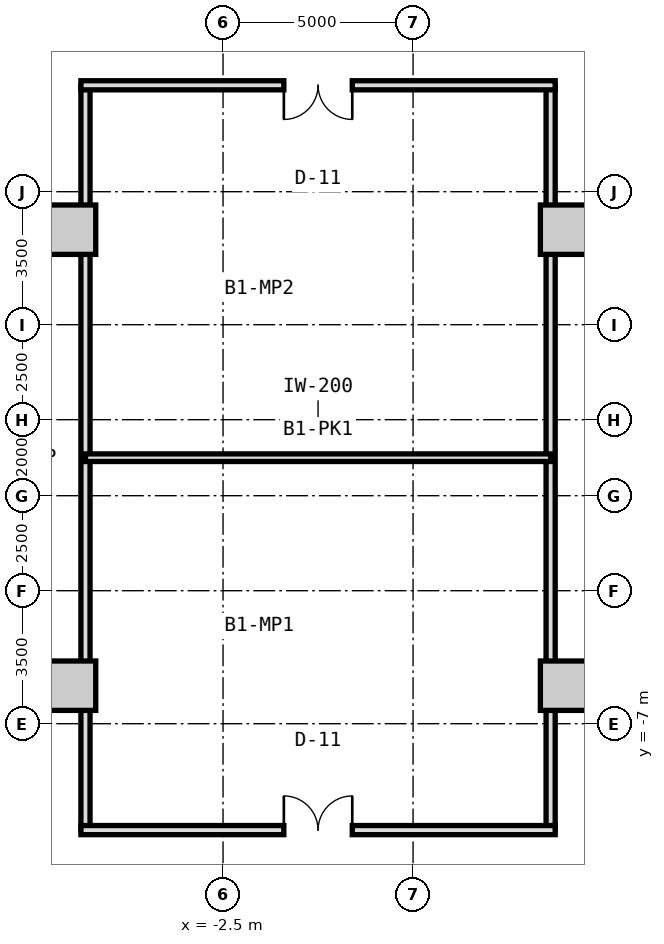
"""IFC4 building model, lengths in metres.
Left out: names, types, materials, properties, quantities, classifications, styles, units other than length and angle.
Written with IfcOpenShell. Run it as: python <this file> out.ifc"""

import sys

from ifc_helpers import new_model, si_unit, direction, frame, frame_2d, origin, origin_2d, place, context, subcontext, project, spatial, rectangle, extrude, source, transform, mapped, element, fill, save


model = new_model("IFC4")
c1 = context("Model", 3, precision=1e-05, world=origin(), true_north=direction((0.0, 1.0)))
c2 = subcontext(c1, "Body", "Model", "MODEL_VIEW")
j1 = project(units=[si_unit("LENGTHUNIT", "METRE"), si_unit("PLANEANGLEUNIT", "RADIAN")], contexts=[c1])
p1 = place(None, origin())
s1 = spatial("IfcSite", under=j1, at=p1, CompositionType="ELEMENT")
p2 = place(p1, origin())
s2 = spatial("IfcBuilding", under=s1, at=p2, CompositionType="ELEMENT")
p3 = place(p2, frame((0.0, 0.0, -4.2)))
s3 = spatial("IfcBuildingStorey", under=s2, at=p3, CompositionType="ELEMENT", Elevation=-4.2)
m1 = source(origin(), c2, "Body", "SweptSolid", [
    extrude(rectangle(XDim=1.3, YDim=1.3, at=origin_2d()), origin(), (0.0, 0.0, 1.0), 4.2),
])
for number, where, z_axis, x_axis in (
    (1, (-6.5, -6.0, 0.0), (0.0, 0.0, 1.0), (1.0, 0.0, 0.0)),
    (2, (-6.5, 6.0, 0.0), (0.0, 0.0, 1.0), (1.0, 0.0, 0.0)),
    (3, (6.5, -6.0, 0.0), (0.0, 0.0, 1.0), (1.0, 0.0, 0.0)),
    (4, (6.5, 6.0, 0.0), (0.0, 0.0, 1.0), (1.0, 0.0, 0.0)),
):
    element("IfcColumn", number, at=place(p3, frame(where, z_axis=z_axis, x_axis=x_axis)), inside=s3, PredefinedType="COLUMN", context=c2, shape_type="MappedRepresentation", body=[
        mapped(m1, transform((0.0, 0.0, 0.0), x_axis=(1.0, 0.0, 0.0), y_axis=(0.0, 1.0, 0.0), z_axis=(0.0, 0.0, 1.0), scale=1.0)),
    ])
m2 = source(origin(), c2, "Body", "SweptSolid", [
    extrude(rectangle(XDim=19.6, YDim=0.24, at=frame_2d((9.8, 0.0))), origin(), (0.0, 0.0, 1.0), 3.115),
])
for number, where, z_axis, x_axis in (
    (5, (-6.12, -9.8, 0.0), (0.0, 0.0, 1.0), (0.0, 1.0, 0.0)),
    (6, (6.12, -9.8, 0.0), (0.0, 0.0, 1.0), (0.0, 1.0, 0.0)),
):
    element("IfcWall", number, at=place(p3, frame(where, z_axis=z_axis, x_axis=x_axis)), inside=s3, PredefinedType="PARTITIONING", context=c2, shape_type="MappedRepresentation", body=[
        mapped(m2, transform((0.0, 0.0, 0.0), x_axis=(1.0, 0.0, 0.0), y_axis=(0.0, 1.0, 0.0), z_axis=(0.0, 0.0, 1.0), scale=1.0)),
    ])
m3 = source(origin(), c2, "Body", "SweptSolid", [
    extrude(rectangle(XDim=12.48, YDim=0.24, at=frame_2d((6.24, 0.0))), origin(), (0.0, 0.0, 1.0), 3.865),
])
p4 = place(p3, frame((-6.24, -9.8, 0.0), z_axis=(0.0, 0.0, 1.0), x_axis=(1.0, 0.0, 0.0)))
e7 = element("IfcWall", 7, at=p4, inside=s3, PredefinedType="PARTITIONING", context=c2, shape_type="MappedRepresentation", body=[
    mapped(m3, transform((0.0, 0.0, 0.0), x_axis=(1.0, 0.0, 0.0), y_axis=(0.0, 1.0, 0.0), z_axis=(0.0, 0.0, 1.0), scale=1.0)),
])
p5 = place(p4, frame((5.34, 0.0, 0.0)))
e8 = element("IfcOpeningElement", 8, at=p5, cuts=e7, PredefinedType="OPENING", context=c2, shape_type="SweptSolid", body=[
    extrude(rectangle(XDim=1.8, YDim=2.4, at=frame_2d((0.9, 1.2))), frame((0.0, 0.13, 0.0), z_axis=(0.0, -1.0, 0.0), x_axis=(1.0, 0.0, 0.0)), (0.0, 0.0, 1.0), 0.26),
])
p6 = place(p3, frame((-6.24, 9.8, 0.0), z_axis=(0.0, 0.0, 1.0), x_axis=(1.0, 0.0, 0.0)))
e9 = element("IfcWall", 9, at=p6, inside=s3, PredefinedType="PARTITIONING", context=c2, shape_type="MappedRepresentation", body=[
    mapped(m3, transform((0.0, 0.0, 0.0), x_axis=(1.0, 0.0, 0.0), y_axis=(0.0, 1.0, 0.0), z_axis=(0.0, 0.0, 1.0), scale=1.0)),
])
p7 = place(p6, frame((5.34, 0.0, 0.0)))
e10 = element("IfcOpeningElement", 10, at=p7, cuts=e9, PredefinedType="OPENING", context=c2, shape_type="SweptSolid", body=[
    extrude(rectangle(XDim=1.8, YDim=2.4, at=frame_2d((0.9, 1.2))), frame((0.0, 0.13, 0.0), z_axis=(0.0, -1.0, 0.0), x_axis=(1.0, 0.0, 0.0)), (0.0, 0.0, 1.0), 0.26),
])
m4 = source(origin(), c2, "Body", "SweptSolid", [
    extrude(rectangle(XDim=12.24, YDim=0.2, at=frame_2d((6.12, 0.0))), origin(), (0.0, 0.0, 1.0), 3.865),
])
p8 = place(p3, frame((-6.12, 0.0, 0.0), z_axis=(0.0, 0.0, 1.0), x_axis=(1.0, 0.0, 0.0)))
e11 = element("IfcWall", 11, at=p8, inside=s3, PredefinedType="PARTITIONING", context=c2, shape_type="MappedRepresentation", body=[
    mapped(m4, transform((0.0, 0.0, 0.0), x_axis=(1.0, 0.0, 0.0), y_axis=(0.0, 1.0, 0.0), z_axis=(0.0, 0.0, 1.0), scale=1.0)),
])
m5 = source(origin(), c2, "Body", "SweptSolid", [
    extrude(rectangle(XDim=1.8, YDim=2.4, at=frame_2d((0.9, 1.2))), frame((0.0, 0.025, 0.0), z_axis=(0.0, -1.0, 0.0), x_axis=(1.0, 0.0, 0.0)), (0.0, 0.0, 1.0), 0.05),
])
p9 = place(p5, origin())
e12 = element("IfcDoor", 12, at=p9, inside=s3, OperationType="DOUBLE_DOOR_SINGLE_SWING", PredefinedType="DOOR", context=c2, shape_type="MappedRepresentation", body=[
    mapped(m5, transform((0.0, 0.0, 0.0), x_axis=(1.0, 0.0, 0.0), y_axis=(0.0, 1.0, 0.0), z_axis=(0.0, 0.0, 1.0), scale=1.0)),
])
fill(e8, e12)
p10 = place(p7, frame((1.8, 0.0, 0.0), z_axis=(0.0, 0.0, 1.0), x_axis=(-1.0, 0.0, 0.0)))
e13 = element("IfcDoor", 13, at=p10, inside=s3, OperationType="DOUBLE_DOOR_SINGLE_SWING", PredefinedType="DOOR", context=c2, shape_type="MappedRepresentation", body=[
    mapped(m5, transform((0.0, 0.0, 0.0), x_axis=(1.0, 0.0, 0.0), y_axis=(0.0, 1.0, 0.0), z_axis=(0.0, 0.0, 1.0), scale=1.0)),
])
fill(e10, e13)
save(model, sys.argv[1])
